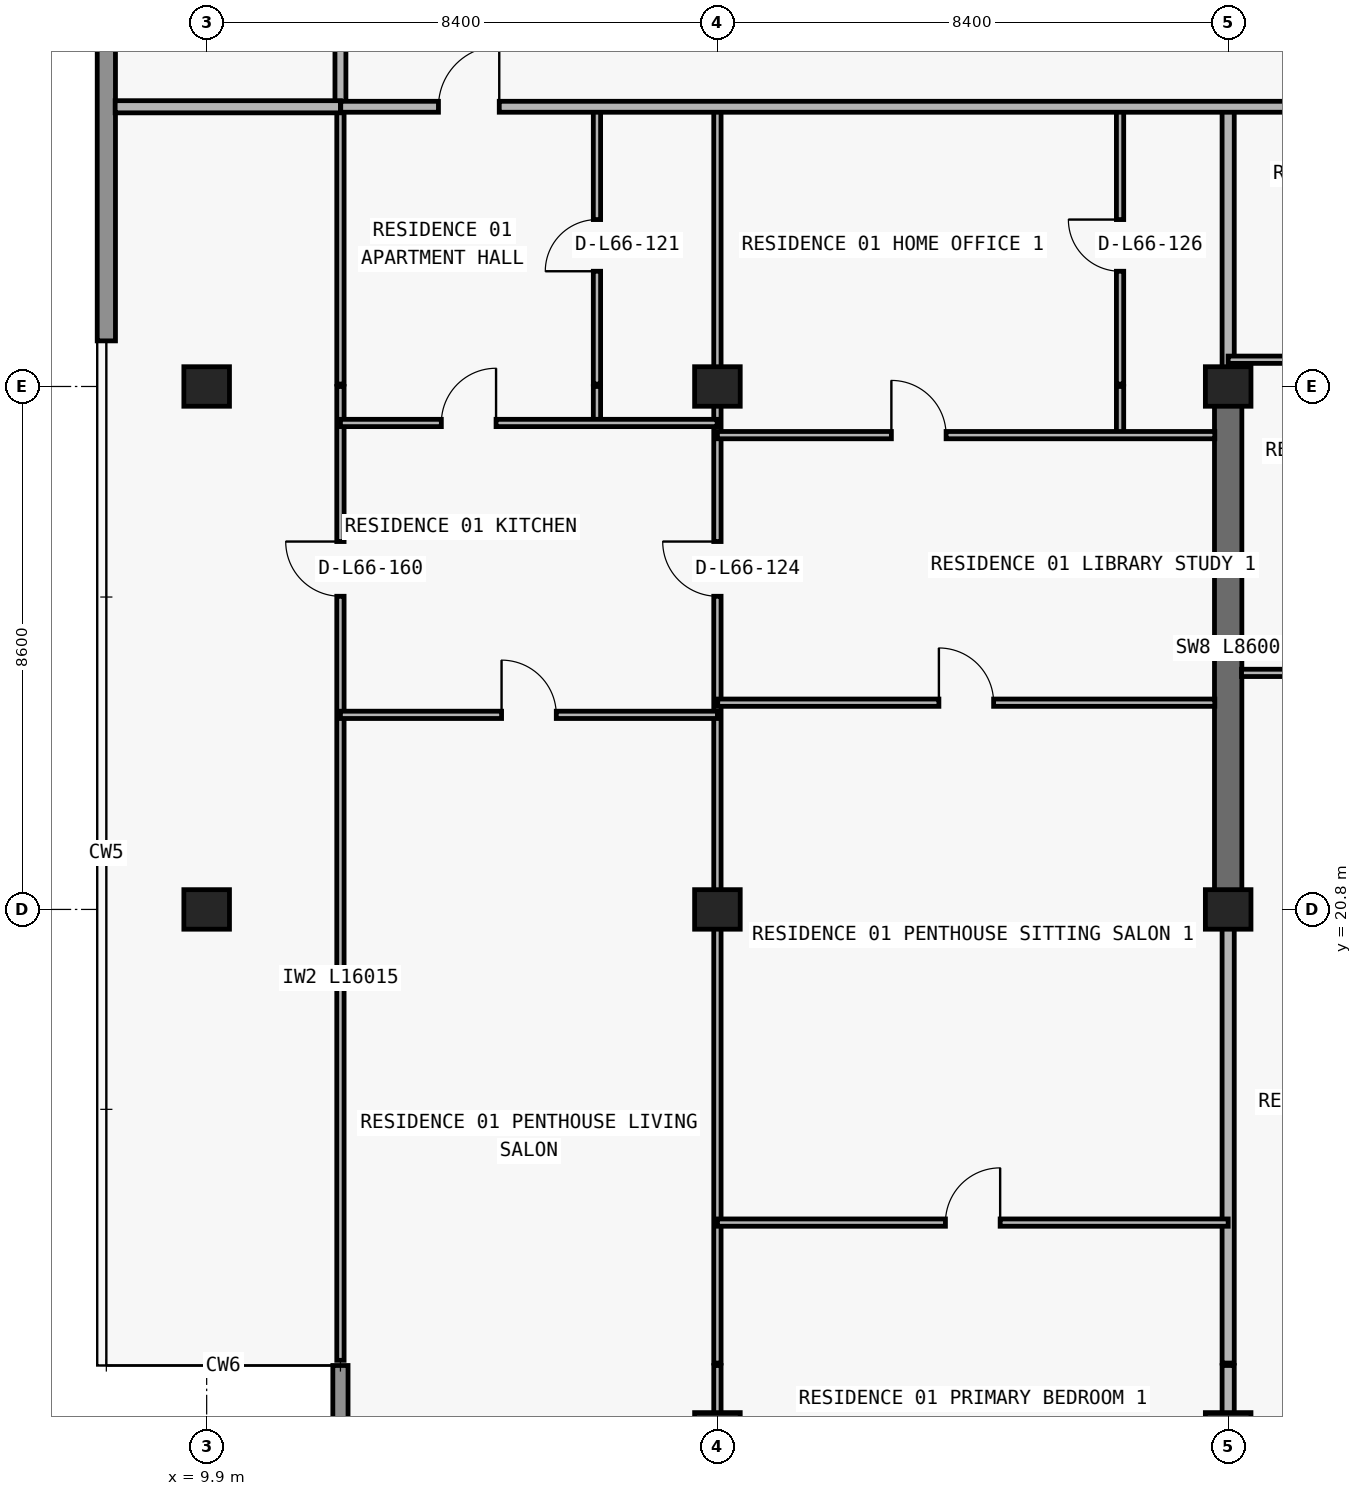
"""IFC4 building model, lengths in metres.
Left out: names, types, materials, properties, quantities, classifications, styles, units other than length and angle.
Written with IfcOpenShell. Run it as: python <this file> out.ifc"""

import sys

from ifc_helpers import new_model, si_unit, direction, frame, frame_2d, origin, origin_2d, place, context, subcontext, project, spatial, rectangle, extrude, element, fill, save


model = new_model("IFC4")
c1 = context("Model", 3, precision=1e-05, world=origin(), true_north=direction((0.0, 1.0)))
c2 = subcontext(c1, "Body", "Model", "MODEL_VIEW")
j1 = project(units=[si_unit("LENGTHUNIT", "METRE"), si_unit("PLANEANGLEUNIT", "RADIAN")], contexts=[c1])
p1 = place(None, origin())
s1 = spatial("IfcSite", under=j1, at=p1, CompositionType="ELEMENT")
p2 = place(p1, origin())
s2 = spatial("IfcBuilding", under=s1, at=p2, CompositionType="ELEMENT")
p3 = place(p2, frame((0.0, 0.0, 236.4)))
s3 = spatial("IfcBuildingStorey", under=s2, at=p3, CompositionType="ELEMENT", Elevation=236.4)
for number, where, z_axis, x_axis in (
    (1, (18.3, 12.2, 0.0), (0.0, 0.0, 1.0), (1.0, 0.0, 0.0)),
    (2, (26.7, 12.2, 0.0), (0.0, 0.0, 1.0), (1.0, 0.0, 0.0)),
    (3, (9.9, 20.8, 0.0), (0.0, 0.0, 1.0), (1.0, 0.0, 0.0)),
    (4, (18.3, 20.8, 0.0), (0.0, 0.0, 1.0), (1.0, 0.0, 0.0)),
    (5, (26.7, 20.8, 0.0), (0.0, 0.0, 1.0), (1.0, 0.0, 0.0)),
    (6, (9.9, 29.4, 0.0), (0.0, 0.0, 1.0), (1.0, 0.0, 0.0)),
    (7, (18.3, 29.4, 0.0), (0.0, 0.0, 1.0), (1.0, 0.0, 0.0)),
    (8, (26.7, 29.4, 0.0), (0.0, 0.0, 1.0), (1.0, 0.0, 0.0)),
):
    element("IfcColumn", number, at=place(p3, frame(where, z_axis=z_axis, x_axis=x_axis)), inside=s3, PredefinedType="COLUMN", context=c2, shape_type="SweptSolid", body=[
        extrude(rectangle(XDim=0.75, YDim=0.65, at=origin_2d()), origin(), (0.0, 0.0, 1.0), 3.05),
    ])
p4 = place(p3, frame((26.7, 20.8, 0.0), z_axis=(0.0, 0.0, 1.0), x_axis=(0.0, 1.0, 0.0)))
e9 = element("IfcWall", 9, at=p4, inside=s3, PredefinedType="SHEAR", context=c2, shape_type="SweptSolid", body=[
    extrude(rectangle(XDim=8.6, YDim=0.45, at=frame_2d((4.3, 0.0))), origin(), (0.0, 0.0, 1.0), 3.05),
])
p5 = place(p3, frame((12.1, 13.3, 0.0), z_axis=(0.0, 0.0, 1.0), x_axis=(0.0, -1.0, 0.0)))
e10 = element("IfcWall", 10, at=p5, inside=s3, PredefinedType="ELEMENTEDWALL", context=c2, shape_type="SweptSolid", body=[
    extrude(rectangle(XDim=3.45, YDim=0.25, at=frame_2d((1.725, 0.0))), origin(), (0.0, 0.0, 1.0), 3.05),
])
p6 = place(p3, frame((8.25, 30.15, 0.0), z_axis=(0.0, 0.0, 1.0), x_axis=(0.0, 1.0, 0.0)))
e11 = element("IfcWall", 11, at=p6, inside=s3, PredefinedType="STANDARD", context=c2, shape_type="SweptSolid", body=[
    extrude(rectangle(XDim=16.85, YDim=0.3, at=frame_2d((8.425, 0.0))), origin(), (0.0, 0.0, 1.0), 3.05),
])
p7 = place(p3, frame((12.1, 13.385, 0.0), z_axis=(0.0, 0.0, 1.0), x_axis=(0.0, 1.0, 0.0)))
e12 = element("IfcWall", 12, at=p7, inside=s3, PredefinedType="PARTITIONING", context=c2, shape_type="SweptSolid", body=[
    extrude(rectangle(XDim=16.015, YDim=0.12, at=frame_2d((8.007, 0.0))), origin(), (0.0, 0.0, 1.0), 2.578),
])
p8 = place(p7, frame((12.565, 0.0, 0.0)))
e13 = element("IfcOpeningElement", 13, at=p8, cuts=e12, PredefinedType="OPENING", context=c2, shape_type="SweptSolid", body=[
    extrude(rectangle(XDim=0.9, YDim=2.15, at=frame_2d((0.45, 1.075))), frame((0.0, 0.07, 0.0), z_axis=(0.0, -1.0, 0.0), x_axis=(1.0, 0.0, 0.0)), (0.0, 0.0, 1.0), 0.14),
])
p9 = place(p3, frame((12.1, 29.44, 0.0), z_axis=(0.0, 0.0, 1.0), x_axis=(0.0, 1.0, 0.0)))
e14 = element("IfcWall", 14, at=p9, inside=s3, PredefinedType="PARTITIONING", context=c2, shape_type="SweptSolid", body=[
    extrude(rectangle(XDim=4.56, YDim=0.12, at=frame_2d((2.28, 0.0))), origin(), (0.0, 0.0, 1.0), 2.578),
])
p10 = place(p3, frame((12.1, 34.005, 0.0), z_axis=(0.0, 0.0, 1.0), x_axis=(0.0, 1.0, 0.0)))
e15 = element("IfcWall", 15, at=p10, inside=s3, PredefinedType="PARTITIONING", context=c2, shape_type="SweptSolid", body=[
    extrude(rectangle(XDim=2.995, YDim=0.18, at=frame_2d((1.498, 0.0))), origin(), (0.0, 0.0, 1.0), 2.578),
])
p11 = place(p3, frame((16.319, 28.8, 0.0), z_axis=(0.0, 0.0, 1.0), x_axis=(0.0, 1.0, 0.0)))
e16 = element("IfcWall", 16, at=p11, inside=s3, PredefinedType="PARTITIONING", context=c2, shape_type="SweptSolid", body=[
    extrude(rectangle(XDim=0.6, YDim=0.12, at=frame_2d((0.3, 0.0))), origin(), (0.0, 0.0, 1.0), 3.05),
])
p12 = place(p3, frame((16.319, 29.44, 0.0), z_axis=(0.0, 0.0, 1.0), x_axis=(0.0, 1.0, 0.0)))
e17 = element("IfcWall", 17, at=p12, inside=s3, PredefinedType="PARTITIONING", context=c2, shape_type="SweptSolid", body=[
    extrude(rectangle(XDim=4.56, YDim=0.12, at=frame_2d((2.28, 0.0))), origin(), (0.0, 0.0, 1.0), 3.05),
])
p13 = place(p12, frame((1.855, 0.0, 0.0)))
e18 = element("IfcOpeningElement", 18, at=p13, cuts=e17, PredefinedType="OPENING", context=c2, shape_type="SweptSolid", body=[
    extrude(rectangle(XDim=0.85, YDim=2.1, at=frame_2d((0.425, 1.05))), frame((0.0, 0.07, 0.0), z_axis=(0.0, -1.0, 0.0), x_axis=(1.0, 0.0, 0.0)), (0.0, 0.0, 1.0), 0.14),
])
p14 = place(p3, frame((18.3, 9.995, 0.0), z_axis=(0.0, 0.0, 1.0), x_axis=(0.0, 1.0, 0.0)))
e19 = element("IfcWall", 19, at=p14, inside=s3, PredefinedType="PARTITIONING", context=c2, shape_type="SweptSolid", body=[
    extrude(rectangle(XDim=3.305, YDim=0.12, at=frame_2d((1.652, 0.0))), origin(), (0.0, 0.0, 1.0), 2.263),
])
p15 = place(p3, frame((18.3, 13.34, 0.0), z_axis=(0.0, 0.0, 1.0), x_axis=(0.0, 1.0, 0.0)))
e20 = element("IfcWall", 20, at=p15, inside=s3, PredefinedType="PARTITIONING", context=c2, shape_type="SweptSolid", body=[
    extrude(rectangle(XDim=16.06, YDim=0.12, at=frame_2d((8.03, 0.0))), origin(), (0.0, 0.0, 1.0), 2.263),
])
p16 = place(p15, frame((12.61, 0.0, 0.0)))
e21 = element("IfcOpeningElement", 21, at=p16, cuts=e20, PredefinedType="OPENING", context=c2, shape_type="SweptSolid", body=[
    extrude(rectangle(XDim=0.9, YDim=2.15, at=frame_2d((0.45, 1.075))), frame((0.0, 0.07, 0.0), z_axis=(0.0, -1.0, 0.0), x_axis=(1.0, 0.0, 0.0)), (0.0, 0.0, 1.0), 0.14),
])
p17 = place(p3, frame((18.3, 29.44, 0.0), z_axis=(0.0, 0.0, 1.0), x_axis=(0.0, 1.0, 0.0)))
e22 = element("IfcWall", 22, at=p17, inside=s3, PredefinedType="PARTITIONING", context=c2, shape_type="SweptSolid", body=[
    extrude(rectangle(XDim=4.56, YDim=0.12, at=frame_2d((2.28, 0.0))), origin(), (0.0, 0.0, 1.0), 2.263),
])
p18 = place(p3, frame((24.922, 28.6, 0.0), z_axis=(0.0, 0.0, 1.0), x_axis=(0.0, 1.0, 0.0)))
e23 = element("IfcWall", 23, at=p18, inside=s3, PredefinedType="PARTITIONING", context=c2, shape_type="SweptSolid", body=[
    extrude(rectangle(XDim=0.8, YDim=0.12, at=frame_2d((0.4, 0.0))), origin(), (0.0, 0.0, 1.0), 3.05),
])
p19 = place(p3, frame((24.922, 29.44, 0.0), z_axis=(0.0, 0.0, 1.0), x_axis=(0.0, 1.0, 0.0)))
e24 = element("IfcWall", 24, at=p19, inside=s3, PredefinedType="PARTITIONING", context=c2, shape_type="SweptSolid", body=[
    extrude(rectangle(XDim=4.56, YDim=0.12, at=frame_2d((2.28, 0.0))), origin(), (0.0, 0.0, 1.0), 3.05),
])
p20 = place(p19, frame((1.855, 0.0, 0.0)))
e25 = element("IfcOpeningElement", 25, at=p20, cuts=e24, PredefinedType="OPENING", context=c2, shape_type="SweptSolid", body=[
    extrude(rectangle(XDim=0.85, YDim=2.1, at=frame_2d((0.425, 1.05))), frame((0.0, 0.07, 0.0), z_axis=(0.0, -1.0, 0.0), x_axis=(1.0, 0.0, 0.0)), (0.0, 0.0, 1.0), 0.14),
])
p21 = place(p3, frame((26.7, 9.995, 0.0), z_axis=(0.0, 0.0, 1.0), x_axis=(0.0, 1.0, 0.0)))
e26 = element("IfcWall", 26, at=p21, inside=s3, PredefinedType="PARTITIONING", context=c2, shape_type="SweptSolid", body=[
    extrude(rectangle(XDim=3.305, YDim=0.2, at=frame_2d((1.652, 0.0))), origin(), (0.0, 0.0, 1.0), 2.263),
])
p22 = place(p3, frame((26.7, 13.34, 0.0), z_axis=(0.0, 0.0, 1.0), x_axis=(0.0, 1.0, 0.0)))
e27 = element("IfcWall", 27, at=p22, inside=s3, PredefinedType="PARTITIONING", context=c2, shape_type="SweptSolid", body=[
    extrude(rectangle(XDim=7.455, YDim=0.2, at=frame_2d((3.728, 0.0))), origin(), (0.0, 0.0, 1.0), 2.263),
])
p23 = place(p3, frame((26.7, 29.44, 0.0), z_axis=(0.0, 0.0, 1.0), x_axis=(0.0, 1.0, 0.0)))
e28 = element("IfcWall", 28, at=p23, inside=s3, PredefinedType="PARTITIONING", context=c2, shape_type="SweptSolid", body=[
    extrude(rectangle(XDim=4.56, YDim=0.2, at=frame_2d((2.28, 0.0))), origin(), (0.0, 0.0, 1.0), 2.335),
])
p24 = place(p3, frame((18.3, 15.65, 0.0), z_axis=(0.0, 0.0, 1.0), x_axis=(1.0, 0.0, 0.0)))
e29 = element("IfcWall", 29, at=p24, inside=s3, PredefinedType="PARTITIONING", context=c2, shape_type="SweptSolid", body=[
    extrude(rectangle(XDim=8.4, YDim=0.12, at=frame_2d((4.2, 0.0))), origin(), (0.0, 0.0, 1.0), 3.05),
])
p25 = place(p24, frame((3.75, 0.0, 0.0)))
e30 = element("IfcOpeningElement", 30, at=p25, cuts=e29, PredefinedType="OPENING", context=c2, shape_type="SweptSolid", body=[
    extrude(rectangle(XDim=0.9, YDim=2.15, at=frame_2d((0.45, 1.075))), frame((0.0, 0.07, 0.0), z_axis=(0.0, -1.0, 0.0), x_axis=(1.0, 0.0, 0.0)), (0.0, 0.0, 1.0), 0.14),
])
p26 = place(p3, frame((12.1, 24.0, 0.0), z_axis=(0.0, 0.0, 1.0), x_axis=(1.0, 0.0, 0.0)))
e31 = element("IfcWall", 31, at=p26, inside=s3, PredefinedType="PARTITIONING", context=c2, shape_type="SweptSolid", body=[
    extrude(rectangle(XDim=6.2, YDim=0.12, at=frame_2d((3.1, 0.0))), origin(), (0.0, 0.0, 1.0), 3.05),
])
p27 = place(p26, frame((2.65, 0.0, 0.0)))
e32 = element("IfcOpeningElement", 32, at=p27, cuts=e31, PredefinedType="OPENING", context=c2, shape_type="SweptSolid", body=[
    extrude(rectangle(XDim=0.9, YDim=2.15, at=frame_2d((0.45, 1.075))), frame((0.0, 0.07, 0.0), z_axis=(0.0, -1.0, 0.0), x_axis=(1.0, 0.0, 0.0)), (0.0, 0.0, 1.0), 0.14),
])
p28 = place(p3, frame((18.305, 24.2, 0.0), z_axis=(0.0, 0.0, 1.0), x_axis=(1.0, 0.0, 0.0)))
e33 = element("IfcWall", 33, at=p28, inside=s3, PredefinedType="PARTITIONING", context=c2, shape_type="SweptSolid", body=[
    extrude(rectangle(XDim=8.175, YDim=0.12, at=frame_2d((4.087, 0.0))), origin(), (0.0, 0.0, 1.0), 3.05),
])
p29 = place(p28, frame((3.637, 0.0, 0.0)))
e34 = element("IfcOpeningElement", 34, at=p29, cuts=e33, PredefinedType="OPENING", context=c2, shape_type="SweptSolid", body=[
    extrude(rectangle(XDim=0.9, YDim=2.15, at=frame_2d((0.45, 1.075))), frame((0.0, 0.07, 0.0), z_axis=(0.0, -1.0, 0.0), x_axis=(1.0, 0.0, 0.0)), (0.0, 0.0, 1.0), 0.14),
])
p30 = place(p3, frame((26.92, 24.69, 0.0), z_axis=(0.0, 0.0, 1.0), x_axis=(1.0, 0.0, 0.0)))
e35 = element("IfcWall", 35, at=p30, inside=s3, PredefinedType="PARTITIONING", context=c2, shape_type="SweptSolid", body=[
    extrude(rectangle(XDim=8.18, YDim=0.12, at=frame_2d((4.09, 0.0))), origin(), (0.0, 0.0, 1.0), 3.05),
])
p31 = place(p30, frame((1.583, 0.0, 0.0)))
e36 = element("IfcOpeningElement", 36, at=p31, cuts=e35, PredefinedType="OPENING", context=c2, shape_type="SweptSolid", body=[
    extrude(rectangle(XDim=0.9, YDim=2.15, at=frame_2d((0.45, 1.075))), frame((0.0, 0.07, 0.0), z_axis=(0.0, -1.0, 0.0), x_axis=(1.0, 0.0, 0.0)), (0.0, 0.0, 1.0), 0.14),
])
p32 = place(p30, frame((5.84, 0.0, 0.0)))
e37 = element("IfcOpeningElement", 37, at=p32, cuts=e35, PredefinedType="OPENING", context=c2, shape_type="SweptSolid", body=[
    extrude(rectangle(XDim=0.9, YDim=2.15, at=frame_2d((0.45, 1.075))), frame((0.0, 0.07, 0.0), z_axis=(0.0, -1.0, 0.0), x_axis=(1.0, 0.0, 0.0)), (0.0, 0.0, 1.0), 0.14),
])
p33 = place(p3, frame((18.3, 28.6, 0.0), z_axis=(0.0, 0.0, 1.0), x_axis=(1.0, 0.0, 0.0)))
e38 = element("IfcWall", 38, at=p33, inside=s3, PredefinedType="PARTITIONING", context=c2, shape_type="SweptSolid", body=[
    extrude(rectangle(XDim=8.18, YDim=0.12, at=frame_2d((4.09, 0.0))), origin(), (0.0, 0.0, 1.0), 3.05),
])
p34 = place(p33, frame((2.861, 0.0, 0.0)))
e39 = element("IfcOpeningElement", 39, at=p34, cuts=e38, PredefinedType="OPENING", context=c2, shape_type="SweptSolid", body=[
    extrude(rectangle(XDim=0.9, YDim=2.15, at=frame_2d((0.45, 1.075))), frame((0.0, 0.07, 0.0), z_axis=(0.0, -1.0, 0.0), x_axis=(1.0, 0.0, 0.0)), (0.0, 0.0, 1.0), 0.14),
])
p35 = place(p3, frame((12.1, 28.8, 0.0), z_axis=(0.0, 0.0, 1.0), x_axis=(1.0, 0.0, 0.0)))
e40 = element("IfcWall", 40, at=p35, inside=s3, PredefinedType="PARTITIONING", context=c2, shape_type="SweptSolid", body=[
    extrude(rectangle(XDim=6.195, YDim=0.12, at=frame_2d((3.097, 0.0))), origin(), (0.0, 0.0, 1.0), 3.05),
])
p36 = place(p35, frame((1.659, 0.0, 0.0)))
e41 = element("IfcOpeningElement", 41, at=p36, cuts=e40, PredefinedType="OPENING", context=c2, shape_type="SweptSolid", body=[
    extrude(rectangle(XDim=0.9, YDim=2.15, at=frame_2d((0.45, 1.075))), frame((0.0, 0.07, 0.0), z_axis=(0.0, -1.0, 0.0), x_axis=(1.0, 0.0, 0.0)), (0.0, 0.0, 1.0), 0.14),
])
p37 = place(p3, frame((26.7, 29.84, 0.0), z_axis=(0.0, 0.0, 1.0), x_axis=(1.0, 0.0, 0.0)))
e42 = element("IfcWall", 42, at=p37, inside=s3, PredefinedType="PARTITIONING", context=c2, shape_type="SweptSolid", body=[
    extrude(rectangle(XDim=8.4, YDim=0.12, at=frame_2d((4.2, 0.0))), origin(), (0.0, 0.0, 1.0), 3.05),
])
p38 = place(p37, frame((1.693, 0.0, 0.0)))
e43 = element("IfcOpeningElement", 43, at=p38, cuts=e42, PredefinedType="OPENING", context=c2, shape_type="SweptSolid", body=[
    extrude(rectangle(XDim=0.9, YDim=2.15, at=frame_2d((0.45, 1.075))), frame((0.0, 0.07, 0.0), z_axis=(0.0, -1.0, 0.0), x_axis=(1.0, 0.0, 0.0)), (0.0, 0.0, 1.0), 0.14),
])
p39 = place(p3, frame((8.395, 34.0, 0.0), z_axis=(0.0, 0.0, 1.0), x_axis=(1.0, 0.0, 0.0)))
e44 = element("IfcWall", 44, at=p39, inside=s3, PredefinedType="PARTITIONING", context=c2, shape_type="SweptSolid", body=[
    extrude(rectangle(XDim=3.705, YDim=0.2, at=frame_2d((1.853, 0.0))), origin(), (0.0, 0.0, 1.0), 3.05),
])
p40 = place(p3, frame((12.105, 34.0, 0.0), z_axis=(0.0, 0.0, 1.0), x_axis=(1.0, 0.0, 0.0)))
e45 = element("IfcWall", 45, at=p40, inside=s3, PredefinedType="PARTITIONING", context=c2, shape_type="SweptSolid", body=[
    extrude(rectangle(XDim=53.595, YDim=0.18, at=frame_2d((26.797, 0.0))), origin(), (0.0, 0.0, 1.0), 3.05),
])
p41 = place(p40, frame((1.607, 0.0, 0.0)))
e46 = element("IfcOpeningElement", 46, at=p41, cuts=e45, PredefinedType="OPENING", context=c2, shape_type="SweptSolid", body=[
    extrude(rectangle(XDim=1.0, YDim=2.2, at=frame_2d((0.5, 1.1))), frame((0.0, 0.1, 0.0), z_axis=(0.0, -1.0, 0.0), x_axis=(1.0, 0.0, 0.0)), (0.0, 0.0, 1.0), 0.2),
])
p42 = place(p40, frame((17.057, 0.0, 0.0)))
e47 = element("IfcOpeningElement", 47, at=p42, cuts=e45, PredefinedType="OPENING", context=c2, shape_type="SweptSolid", body=[
    extrude(rectangle(XDim=1.0, YDim=2.2, at=frame_2d((0.5, 1.1))), frame((0.0, 0.1, 0.0), z_axis=(0.0, -1.0, 0.0), x_axis=(1.0, 0.0, 0.0)), (0.0, 0.0, 1.0), 0.2),
])
p43 = place(p40, frame((25.242, 0.0, 0.0)))
e48 = element("IfcOpeningElement", 48, at=p43, cuts=e45, PredefinedType="OPENING", context=c2, shape_type="SweptSolid", body=[
    extrude(rectangle(XDim=1.0, YDim=2.2, at=frame_2d((0.5, 1.1))), frame((0.0, 0.1, 0.0), z_axis=(0.0, -1.0, 0.0), x_axis=(1.0, 0.0, 0.0)), (0.0, 0.0, 1.0), 0.2),
])
p44 = place(p40, frame((33.092, 0.0, 0.0)))
e49 = element("IfcOpeningElement", 49, at=p44, cuts=e45, PredefinedType="OPENING", context=c2, shape_type="SweptSolid", body=[
    extrude(rectangle(XDim=1.0, YDim=2.2, at=frame_2d((0.5, 1.1))), frame((0.0, 0.1, 0.0), z_axis=(0.0, -1.0, 0.0), x_axis=(1.0, 0.0, 0.0)), (0.0, 0.0, 1.0), 0.2),
])
p45 = place(p40, frame((41.705, 0.0, 0.0)))
e50 = element("IfcOpeningElement", 50, at=p45, cuts=e45, PredefinedType="OPENING", context=c2, shape_type="SweptSolid", body=[
    extrude(rectangle(XDim=1.0, YDim=2.2, at=frame_2d((0.5, 1.1))), frame((0.0, 0.1, 0.0), z_axis=(0.0, -1.0, 0.0), x_axis=(1.0, 0.0, 0.0)), (0.0, 0.0, 1.0), 0.2),
])
p46 = place(p41, origin())
e51 = element("IfcDoor", 51, at=p46, inside=s3, OperationType="SINGLE_SWING_RIGHT", PredefinedType="DOOR", context=c2, shape_type="SweptSolid", body=[
    extrude(rectangle(XDim=1.0, YDim=2.2, at=frame_2d((0.5, 1.1))), frame((0.0, 0.025, 0.0), z_axis=(0.0, -1.0, 0.0), x_axis=(1.0, 0.0, 0.0)), (0.0, 0.0, 1.0), 0.05),
])
fill(e46, e51)
p47 = place(p13, origin())
e52 = element("IfcDoor", 52, at=p47, inside=s3, OperationType="SINGLE_SWING_LEFT", PredefinedType="DOOR", context=c2, shape_type="SweptSolid", body=[
    extrude(rectangle(XDim=0.85, YDim=2.1, at=frame_2d((0.425, 1.05))), frame((0.0, 0.025, 0.0), z_axis=(0.0, -1.0, 0.0), x_axis=(1.0, 0.0, 0.0)), (0.0, 0.0, 1.0), 0.05),
])
fill(e18, e52)
p48 = place(p36, origin())
e53 = element("IfcDoor", 53, at=p48, inside=s3, OperationType="SINGLE_SWING_RIGHT", PredefinedType="DOOR", context=c2, shape_type="SweptSolid", body=[
    extrude(rectangle(XDim=0.9, YDim=2.15, at=frame_2d((0.45, 1.075))), frame((0.0, 0.025, 0.0), z_axis=(0.0, -1.0, 0.0), x_axis=(1.0, 0.0, 0.0)), (0.0, 0.0, 1.0), 0.05),
])
fill(e41, e53)
p49 = place(p27, origin())
e54 = element("IfcDoor", 54, at=p49, inside=s3, OperationType="SINGLE_SWING_LEFT", PredefinedType="DOOR", context=c2, shape_type="SweptSolid", body=[
    extrude(rectangle(XDim=0.9, YDim=2.15, at=frame_2d((0.45, 1.075))), frame((0.0, 0.025, 0.0), z_axis=(0.0, -1.0, 0.0), x_axis=(1.0, 0.0, 0.0)), (0.0, 0.0, 1.0), 0.05),
])
fill(e32, e54)
p50 = place(p16, origin())
e55 = element("IfcDoor", 55, at=p50, inside=s3, OperationType="SINGLE_SWING_RIGHT", PredefinedType="DOOR", context=c2, shape_type="SweptSolid", body=[
    extrude(rectangle(XDim=0.9, YDim=2.15, at=frame_2d((0.45, 1.075))), frame((0.0, 0.025, 0.0), z_axis=(0.0, -1.0, 0.0), x_axis=(1.0, 0.0, 0.0)), (0.0, 0.0, 1.0), 0.05),
])
fill(e21, e55)
p51 = place(p34, origin())
e56 = element("IfcDoor", 56, at=p51, inside=s3, OperationType="SINGLE_SWING_LEFT", PredefinedType="DOOR", context=c2, shape_type="SweptSolid", body=[
    extrude(rectangle(XDim=0.9, YDim=2.15, at=frame_2d((0.45, 1.075))), frame((0.0, 0.025, 0.0), z_axis=(0.0, -1.0, 0.0), x_axis=(1.0, 0.0, 0.0)), (0.0, 0.0, 1.0), 0.05),
])
fill(e39, e56)
p52 = place(p20, origin())
e57 = element("IfcDoor", 57, at=p52, inside=s3, OperationType="SINGLE_SWING_RIGHT", PredefinedType="DOOR", context=c2, shape_type="SweptSolid", body=[
    extrude(rectangle(XDim=0.85, YDim=2.1, at=frame_2d((0.425, 1.05))), frame((0.0, 0.025, 0.0), z_axis=(0.0, -1.0, 0.0), x_axis=(1.0, 0.0, 0.0)), (0.0, 0.0, 1.0), 0.05),
])
fill(e25, e57)
p53 = place(p29, origin())
e58 = element("IfcDoor", 58, at=p53, inside=s3, OperationType="SINGLE_SWING_LEFT", PredefinedType="DOOR", context=c2, shape_type="SweptSolid", body=[
    extrude(rectangle(XDim=0.9, YDim=2.15, at=frame_2d((0.45, 1.075))), frame((0.0, 0.025, 0.0), z_axis=(0.0, -1.0, 0.0), x_axis=(1.0, 0.0, 0.0)), (0.0, 0.0, 1.0), 0.05),
])
fill(e34, e58)
p54 = place(p25, origin())
e59 = element("IfcDoor", 59, at=p54, inside=s3, OperationType="SINGLE_SWING_RIGHT", PredefinedType="DOOR", context=c2, shape_type="SweptSolid", body=[
    extrude(rectangle(XDim=0.9, YDim=2.15, at=frame_2d((0.45, 1.075))), frame((0.0, 0.025, 0.0), z_axis=(0.0, -1.0, 0.0), x_axis=(1.0, 0.0, 0.0)), (0.0, 0.0, 1.0), 0.05),
])
fill(e30, e59)
p55 = place(p8, origin())
e60 = element("IfcDoor", 60, at=p55, inside=s3, OperationType="SINGLE_SWING_RIGHT", PredefinedType="DOOR", context=c2, shape_type="SweptSolid", body=[
    extrude(rectangle(XDim=0.9, YDim=2.15, at=frame_2d((0.45, 1.075))), frame((0.0, 0.025, 0.0), z_axis=(0.0, -1.0, 0.0), x_axis=(1.0, 0.0, 0.0)), (0.0, 0.0, 1.0), 0.05),
])
fill(e13, e60)
save(model, sys.argv[1])
